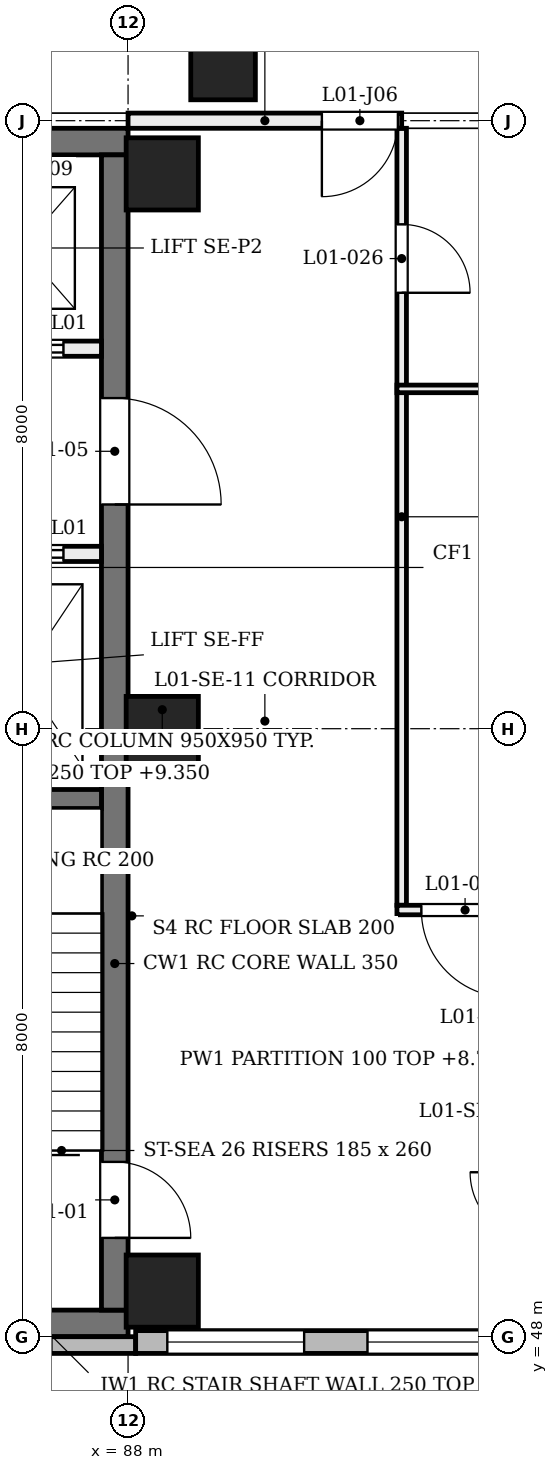
"""IFC4 building model, lengths in metres.
Left out: names, types, materials, properties, quantities, classifications, styles, units other than length and angle.
Written with IfcOpenShell. Run it as: python <this file> out.ifc"""

import sys

from ifc_helpers import new_model, si_unit, direction, frame, frame_2d, origin, origin_2d, place, context, subcontext, project, spatial, rectangle, extrude, element, fill, save


model = new_model("IFC4")
c1 = context("Model", 3, precision=1e-05, world=origin(), true_north=direction((0.0, 1.0)))
c2 = subcontext(c1, "Body", "Model", "MODEL_VIEW")
j1 = project(units=[si_unit("LENGTHUNIT", "METRE"), si_unit("PLANEANGLEUNIT", "RADIAN")], contexts=[c1])
p1 = place(None, origin())
s1 = spatial("IfcSite", under=j1, at=p1, CompositionType="ELEMENT")
p2 = place(p1, origin())
s2 = spatial("IfcBuilding", under=s1, at=p2, CompositionType="ELEMENT")
p3 = place(p2, frame((0.0, 0.0, 4.8)))
s3 = spatial("IfcBuildingStorey", under=s2, at=p3, CompositionType="ELEMENT", Elevation=4.8)
for number, where, z_axis, x_axis in (
    (1, (80.1, 48.175, 0.0), (0.0, 0.0, 1.0), (1.0, 0.0, 0.0)),
    (2, (80.1, 63.725, 0.0), (0.0, 0.0, 1.0), (1.0, 0.0, 0.0)),
):
    element("IfcWall", number, at=place(p3, frame(where, z_axis=z_axis, x_axis=x_axis)), inside=s3, PredefinedType="SHEAR", context=c2, shape_type="SweptSolid", body=[
        extrude(rectangle(XDim=7.9, YDim=0.35, at=frame_2d((3.95, 0.0))), origin(), (0.0, 0.0, 1.0), 4.58),
    ])
p4 = place(p3, frame((87.825, 48.35, 0.0), z_axis=(0.0, 0.0, 1.0), x_axis=(0.0, 1.0, 0.0)))
e3 = element("IfcWall", 3, at=p4, inside=s3, PredefinedType="SHEAR", context=c2, shape_type="SweptSolid", body=[
    extrude(rectangle(XDim=15.2, YDim=0.35, at=frame_2d((7.6, 0.0))), origin(), (0.0, 0.0, 1.0), 4.58),
])
p5 = place(p4, frame((0.95, 0.0, 0.0)))
e4 = element("IfcOpeningElement", 4, at=p5, cuts=e3, PredefinedType="OPENING", context=c2, shape_type="SweptSolid", body=[
    extrude(rectangle(XDim=1.0, YDim=2.1, at=frame_2d((0.5, 1.05))), frame((0.0, 0.185, 0.0), z_axis=(0.0, -1.0, 0.0), x_axis=(1.0, 0.0, 0.0)), (0.0, 0.0, 1.0), 0.37),
])
p6 = place(p4, frame((10.6, 0.0, 0.0)))
e5 = element("IfcOpeningElement", 5, at=p6, cuts=e3, PredefinedType="OPENING", context=c2, shape_type="SweptSolid", body=[
    extrude(rectangle(XDim=1.4, YDim=2.1, at=frame_2d((0.7, 1.05))), frame((0.0, 0.185, 0.0), z_axis=(0.0, -1.0, 0.0), x_axis=(1.0, 0.0, 0.0)), (0.0, 0.0, 1.0), 0.37),
])
for number, where, z_axis, x_axis in (
    (6, (88.45, 48.6, 0.0), (0.0, 0.0, 1.0), (1.0, 0.0, 0.0)),
    (7, (88.45, 55.95, 0.0), (0.0, 0.0, 1.0), (1.0, 0.0, 0.0)),
    (8, (88.45, 63.3, 0.0), (0.0, 0.0, 1.0), (1.0, 0.0, 0.0)),
):
    element("IfcColumn", number, at=place(p3, frame(where, z_axis=z_axis, x_axis=x_axis)), inside=s3, PredefinedType="COLUMN", context=c2, shape_type="SweptSolid", body=[
        extrude(rectangle(XDim=0.95, YDim=0.95, at=origin_2d()), origin(), (0.0, 0.0, 1.0), 4.8),
    ])
p7 = place(p3, frame((89.0, 64.7, 0.0), z_axis=(0.203952265704, 0.0, 0.978980833987), x_axis=(0.0, 1.0, 0.0)))
e9 = element("IfcColumn", 9, at=p7, inside=s3, PredefinedType="COLUMN", context=c2, shape_type="SweptSolid", body=[
    extrude(rectangle(XDim=0.85, YDim=0.85, at=origin_2d()), origin(), (0.0, 0.0, 1.0), 4.903),
])
p8 = place(p3, frame((79.9, 47.89, 0.0), z_axis=(0.0, 0.0, 1.0), x_axis=(1.0, 0.0, 0.0)))
e10 = element("IfcWall", 10, at=p8, inside=s3, PredefinedType="SOLIDWALL", context=c2, shape_type="SweptSolid", body=[
    extrude(rectangle(XDim=8.2, YDim=0.22, at=frame_2d((4.1, 0.0))), origin(), (0.0, 0.0, 1.0), 3.9),
])
p9 = place(p8, frame((1.308, 0.0, 0.9)))
e11 = element("IfcOpeningElement", 11, at=p9, cuts=e10, PredefinedType="OPENING", context=c2, shape_type="SweptSolid", body=[
    extrude(rectangle(XDim=0.45, YDim=2.6, at=frame_2d((0.225, 1.3))), frame((0.0, 0.12, 0.0), z_axis=(0.0, -1.0, 0.0), x_axis=(1.0, 0.0, 0.0)), (0.0, 0.0, 1.0), 0.24),
])
p10 = place(p8, frame((3.975, 0.0, 0.9)))
e12 = element("IfcOpeningElement", 12, at=p10, cuts=e10, PredefinedType="OPENING", context=c2, shape_type="SweptSolid", body=[
    extrude(rectangle(XDim=0.45, YDim=2.6, at=frame_2d((0.225, 1.3))), frame((0.0, 0.12, 0.0), z_axis=(0.0, -1.0, 0.0), x_axis=(1.0, 0.0, 0.0)), (0.0, 0.0, 1.0), 0.24),
])
p11 = place(p8, frame((6.642, 0.0, 0.9)))
e13 = element("IfcOpeningElement", 13, at=p11, cuts=e10, PredefinedType="OPENING", context=c2, shape_type="SweptSolid", body=[
    extrude(rectangle(XDim=0.45, YDim=2.6, at=frame_2d((0.225, 1.3))), frame((0.0, 0.12, 0.0), z_axis=(0.0, -1.0, 0.0), x_axis=(1.0, 0.0, 0.0)), (0.0, 0.0, 1.0), 0.24),
])
p12 = place(p3, frame((88.1, 47.93, 0.0), z_axis=(0.0, 0.0, 1.0), x_axis=(1.0, 0.0, 0.0)))
e14 = element("IfcWall", 14, at=p12, inside=s3, PredefinedType="SOLIDWALL", context=c2, shape_type="SweptSolid", body=[
    extrude(rectangle(XDim=7.9, YDim=0.3, at=frame_2d((3.95, 0.0))), origin(), (0.0, 0.0, 1.0), 3.9),
])
p13 = place(p12, frame((0.417, 0.0, 0.75)))
e15 = element("IfcOpeningElement", 15, at=p13, cuts=e14, PredefinedType="OPENING", context=c2, shape_type="SweptSolid", body=[
    extrude(rectangle(XDim=1.8, YDim=3.1, at=frame_2d((0.9, 1.55))), frame((0.0, 0.16, 0.0), z_axis=(0.0, -1.0, 0.0), x_axis=(1.0, 0.0, 0.0)), (0.0, 0.0, 1.0), 0.32),
])
p14 = place(p12, frame((3.05, 0.0, 0.75)))
e16 = element("IfcOpeningElement", 16, at=p14, cuts=e14, PredefinedType="OPENING", context=c2, shape_type="SweptSolid", body=[
    extrude(rectangle(XDim=1.8, YDim=3.1, at=frame_2d((0.9, 1.55))), frame((0.0, 0.16, 0.0), z_axis=(0.0, -1.0, 0.0), x_axis=(1.0, 0.0, 0.0)), (0.0, 0.0, 1.0), 0.32),
])
p15 = place(p12, frame((5.683, 0.0, 0.75)))
e17 = element("IfcOpeningElement", 17, at=p15, cuts=e14, PredefinedType="OPENING", context=c2, shape_type="SweptSolid", body=[
    extrude(rectangle(XDim=1.8, YDim=3.1, at=frame_2d((0.9, 1.55))), frame((0.0, 0.16, 0.0), z_axis=(0.0, -1.0, 0.0), x_axis=(1.0, 0.0, 0.0)), (0.0, 0.0, 1.0), 0.32),
])
p16 = place(p3, frame((87.65, 55.075, 0.0), z_axis=(0.0, 0.0, 1.0), x_axis=(-1.0, 0.0, 0.0)))
e18 = element("IfcWall", 18, at=p16, inside=s3, PredefinedType="SOLIDWALL", context=c2, shape_type="SweptSolid", body=[
    extrude(rectangle(XDim=3.1, YDim=0.25, at=frame_2d((1.55, 0.0))), origin(), (0.0, 0.0, 1.0), 4.55),
])
p17 = place(p3, frame((87.65, 58.3, 0.0), z_axis=(0.0, 0.0, 1.0), x_axis=(-1.0, 0.0, 0.0)))
e19 = element("IfcWall", 19, at=p17, inside=s3, PredefinedType="SOLIDWALL", context=c2, shape_type="SweptSolid", body=[
    extrude(rectangle(XDim=7.2, YDim=0.2, at=frame_2d((3.6, 0.0))), origin(), (0.0, 0.0, 1.0), 4.55),
])
p18 = place(p17, frame((0.5, 0.0, 0.0)))
e20 = element("IfcOpeningElement", 20, at=p18, cuts=e19, PredefinedType="OPENING", context=c2, shape_type="SweptSolid", body=[
    extrude(rectangle(XDim=1.1, YDim=2.1, at=frame_2d((0.55, 1.05))), frame((0.0, 0.11, 0.0), z_axis=(0.0, -1.0, 0.0), x_axis=(1.0, 0.0, 0.0)), (0.0, 0.0, 1.0), 0.22),
])
p19 = place(p17, frame((5.6, 0.0, 0.0)))
e21 = element("IfcOpeningElement", 21, at=p19, cuts=e19, PredefinedType="OPENING", context=c2, shape_type="SweptSolid", body=[
    extrude(rectangle(XDim=1.1, YDim=2.1, at=frame_2d((0.55, 1.05))), frame((0.0, 0.11, 0.0), z_axis=(0.0, -1.0, 0.0), x_axis=(1.0, 0.0, 0.0)), (0.0, 0.0, 1.0), 0.22),
])
p20 = place(p17, frame((3.1, 0.0, 0.0)))
e22 = element("IfcOpeningElement", 22, at=p20, cuts=e19, PredefinedType="OPENING", context=c2, shape_type="SweptSolid", body=[
    extrude(rectangle(XDim=1.0, YDim=2.1, at=frame_2d((0.5, 1.05))), frame((0.0, 0.11, 0.0), z_axis=(0.0, -1.0, 0.0), x_axis=(1.0, 0.0, 0.0)), (0.0, 0.0, 1.0), 0.22),
])
p21 = place(p3, frame((87.65, 61.0, 0.0), z_axis=(0.0, 0.0, 1.0), x_axis=(-1.0, 0.0, 0.0)))
e23 = element("IfcWall", 23, at=p21, inside=s3, PredefinedType="SOLIDWALL", context=c2, shape_type="SweptSolid", body=[
    extrude(rectangle(XDim=7.2, YDim=0.2, at=frame_2d((3.6, 0.0))), origin(), (0.0, 0.0, 1.0), 4.55),
])
p22 = place(p21, frame((0.5, 0.0, 0.0)))
e24 = element("IfcOpeningElement", 24, at=p22, cuts=e23, PredefinedType="OPENING", context=c2, shape_type="SweptSolid", body=[
    extrude(rectangle(XDim=1.1, YDim=2.1, at=frame_2d((0.55, 1.05))), frame((0.0, 0.11, 0.0), z_axis=(0.0, -1.0, 0.0), x_axis=(1.0, 0.0, 0.0)), (0.0, 0.0, 1.0), 0.22),
])
p23 = place(p21, frame((5.6, 0.0, 0.0)))
e25 = element("IfcOpeningElement", 25, at=p23, cuts=e23, PredefinedType="OPENING", context=c2, shape_type="SweptSolid", body=[
    extrude(rectangle(XDim=1.1, YDim=2.1, at=frame_2d((0.55, 1.05))), frame((0.0, 0.11, 0.0), z_axis=(0.0, -1.0, 0.0), x_axis=(1.0, 0.0, 0.0)), (0.0, 0.0, 1.0), 0.22),
])
p24 = place(p21, frame((3.1, 0.0, 0.0)))
e26 = element("IfcOpeningElement", 26, at=p24, cuts=e23, PredefinedType="OPENING", context=c2, shape_type="SweptSolid", body=[
    extrude(rectangle(XDim=1.0, YDim=2.1, at=frame_2d((0.5, 1.05))), frame((0.0, 0.11, 0.0), z_axis=(0.0, -1.0, 0.0), x_axis=(1.0, 0.0, 0.0)), (0.0, 0.0, 1.0), 0.22),
])
p25 = place(p3, frame((91.6, 53.677, 0.0), z_axis=(0.0, 0.0, 1.0), x_axis=(0.0, 1.0, 0.0)))
e27 = element("IfcWall", 27, at=p25, inside=s3, PredefinedType="PARTITIONING", context=c2, shape_type="SweptSolid", body=[
    extrude(rectangle(XDim=10.223, YDim=0.125, at=frame_2d((5.112, 0.0))), origin(), (0.0, 0.0, 1.0), 3.88),
])
p26 = place(p25, frame((8.059, 0.0, 0.0)))
e28 = element("IfcOpeningElement", 28, at=p26, cuts=e27, PredefinedType="OPENING", context=c2, shape_type="SweptSolid", body=[
    extrude(rectangle(XDim=0.9, YDim=2.1, at=frame_2d((0.45, 1.05))), frame((0.0, 0.073, 0.0), z_axis=(0.0, -1.0, 0.0), x_axis=(1.0, 0.0, 0.0)), (0.0, 0.0, 1.0), 0.145),
])
p27 = place(p3, frame((91.538, 53.614, 0.0), z_axis=(0.0, 0.0, 1.0), x_axis=(1.0, 0.0, 0.0)))
e29 = element("IfcWall", 29, at=p27, inside=s3, PredefinedType="PARTITIONING", context=c2, shape_type="SweptSolid", body=[
    extrude(rectangle(XDim=1.925, YDim=0.125, at=frame_2d((0.962, 0.0))), origin(), (0.0, 0.0, 1.0), 4.56),
])
p28 = place(p27, frame((0.322, 0.0, 0.0)))
e30 = element("IfcOpeningElement", 30, at=p28, cuts=e29, PredefinedType="OPENING", context=c2, shape_type="SweptSolid", body=[
    extrude(rectangle(XDim=1.15, YDim=2.1, at=frame_2d((0.575, 1.05))), frame((0.0, 0.073, 0.0), z_axis=(0.0, -1.0, 0.0), x_axis=(1.0, 0.0, 0.0)), (0.0, 0.0, 1.0), 0.145),
])
p29 = place(p3, frame((91.538, 60.471, 0.0), z_axis=(0.0, 0.0, 1.0), x_axis=(1.0, 0.0, 0.0)))
e31 = element("IfcWall", 31, at=p29, inside=s3, PredefinedType="PARTITIONING", context=c2, shape_type="SweptSolid", body=[
    extrude(rectangle(XDim=4.162, YDim=0.1, at=frame_2d((2.081, 0.0))), origin(), (0.0, 0.0, 1.0), 3.98),
])
p30 = place(p3, frame((88.0, 64.0, 0.0), z_axis=(0.0, 0.0, 1.0), x_axis=(1.0, 0.0, 0.0)))
e32 = element("IfcWall", 32, at=p30, inside=s3, PredefinedType="PARTITIONING", context=c2, shape_type="SweptSolid", body=[
    extrude(rectangle(XDim=3.6, YDim=0.2, at=frame_2d((1.8, 0.0))), origin(), (0.0, 0.0, 1.0), 3.88),
])
p31 = place(p30, frame((2.55, 0.0, 0.0)))
e33 = element("IfcOpeningElement", 33, at=p31, cuts=e32, PredefinedType="OPENING", context=c2, shape_type="SweptSolid", body=[
    extrude(rectangle(XDim=1.0, YDim=2.1, at=frame_2d((0.5, 1.05))), frame((0.0, 0.11, 0.0), z_axis=(0.0, -1.0, 0.0), x_axis=(1.0, 0.0, 0.0)), (0.0, 0.0, 1.0), 0.22),
])
p32 = place(p13, origin())
e34 = element("IfcWindow", 34, at=p32, inside=s3, PartitioningType="SINGLE_PANEL", PredefinedType="WINDOW", context=c2, shape_type="SweptSolid", body=[
    extrude(rectangle(XDim=1.8, YDim=3.1, at=frame_2d((0.9, 1.55))), frame((0.0, 0.03, 0.0), z_axis=(0.0, -1.0, 0.0), x_axis=(1.0, 0.0, 0.0)), (0.0, 0.0, 1.0), 0.06),
])
fill(e15, e34)
p33 = place(p14, origin())
e35 = element("IfcWindow", 35, at=p33, inside=s3, PartitioningType="SINGLE_PANEL", PredefinedType="WINDOW", context=c2, shape_type="SweptSolid", body=[
    extrude(rectangle(XDim=1.8, YDim=3.1, at=frame_2d((0.9, 1.55))), frame((0.0, 0.03, 0.0), z_axis=(0.0, -1.0, 0.0), x_axis=(1.0, 0.0, 0.0)), (0.0, 0.0, 1.0), 0.06),
])
fill(e16, e35)
p34 = place(p5, frame((1.0, 0.0, 0.0), z_axis=(0.0, 0.0, 1.0), x_axis=(-1.0, 0.0, 0.0)))
e36 = element("IfcDoor", 36, at=p34, inside=s3, OperationType="SINGLE_SWING_LEFT", PredefinedType="DOOR", context=c2, shape_type="SweptSolid", body=[
    extrude(rectangle(XDim=1.0, YDim=2.1, at=frame_2d((0.5, 1.05))), frame((0.0, 0.025, 0.0), z_axis=(0.0, -1.0, 0.0), x_axis=(1.0, 0.0, 0.0)), (0.0, 0.0, 1.0), 0.05),
])
fill(e4, e36)
p35 = place(p18, frame((1.1, 0.0, 0.0), z_axis=(0.0, 0.0, 1.0), x_axis=(-1.0, 0.0, 0.0)))
e37 = element("IfcDoor", 37, at=p35, inside=s3, OperationType="DOUBLE_DOOR_SLIDING", PredefinedType="DOOR", context=c2, shape_type="SweptSolid", body=[
    extrude(rectangle(XDim=1.1, YDim=2.1, at=frame_2d((0.55, 1.05))), frame((0.0, 0.025, 0.0), z_axis=(0.0, -1.0, 0.0), x_axis=(1.0, 0.0, 0.0)), (0.0, 0.0, 1.0), 0.05),
])
fill(e20, e37)
p36 = place(p22, origin())
e38 = element("IfcDoor", 38, at=p36, inside=s3, OperationType="DOUBLE_DOOR_SLIDING", PredefinedType="DOOR", context=c2, shape_type="SweptSolid", body=[
    extrude(rectangle(XDim=1.1, YDim=2.1, at=frame_2d((0.55, 1.05))), frame((0.0, 0.025, 0.0), z_axis=(0.0, -1.0, 0.0), x_axis=(1.0, 0.0, 0.0)), (0.0, 0.0, 1.0), 0.05),
])
fill(e24, e38)
p37 = place(p6, frame((1.4, 0.0, 0.0), z_axis=(0.0, 0.0, 1.0), x_axis=(-1.0, 0.0, 0.0)))
e39 = element("IfcDoor", 39, at=p37, inside=s3, OperationType="SINGLE_SWING_LEFT", PredefinedType="DOOR", context=c2, shape_type="SweptSolid", body=[
    extrude(rectangle(XDim=1.4, YDim=2.1, at=frame_2d((0.7, 1.05))), frame((0.0, 0.025, 0.0), z_axis=(0.0, -1.0, 0.0), x_axis=(1.0, 0.0, 0.0)), (0.0, 0.0, 1.0), 0.05),
])
fill(e5, e39)
p38 = place(p28, origin())
e40 = element("IfcDoor", 40, at=p38, inside=s3, OperationType="SINGLE_SWING_RIGHT", PredefinedType="DOOR", context=c2, shape_type="SweptSolid", body=[
    extrude(rectangle(XDim=1.15, YDim=2.1, at=frame_2d((0.575, 1.05))), frame((0.0, 0.025, 0.0), z_axis=(0.0, -1.0, 0.0), x_axis=(1.0, 0.0, 0.0)), (0.0, 0.0, 1.0), 0.05),
])
fill(e30, e40)
p39 = place(p26, frame((0.9, 0.0, 0.0), z_axis=(0.0, 0.0, 1.0), x_axis=(-1.0, 0.0, 0.0)))
e41 = element("IfcDoor", 41, at=p39, inside=s3, OperationType="SINGLE_SWING_LEFT", PredefinedType="DOOR", context=c2, shape_type="SweptSolid", body=[
    extrude(rectangle(XDim=0.9, YDim=2.1, at=frame_2d((0.45, 1.05))), frame((0.0, 0.025, 0.0), z_axis=(0.0, -1.0, 0.0), x_axis=(1.0, 0.0, 0.0)), (0.0, 0.0, 1.0), 0.05),
])
fill(e28, e41)
p40 = place(p31, frame((1.0, 0.0, 0.0), z_axis=(0.0, 0.0, 1.0), x_axis=(-1.0, 0.0, 0.0)))
e42 = element("IfcDoor", 42, at=p40, inside=s3, OperationType="SINGLE_SWING_LEFT", PredefinedType="DOOR", context=c2, shape_type="SweptSolid", body=[
    extrude(rectangle(XDim=1.0, YDim=2.1, at=frame_2d((0.5, 1.05))), frame((0.0, 0.025, 0.0), z_axis=(0.0, -1.0, 0.0), x_axis=(1.0, 0.0, 0.0)), (0.0, 0.0, 1.0), 0.05),
])
fill(e33, e42)
save(model, sys.argv[1])
